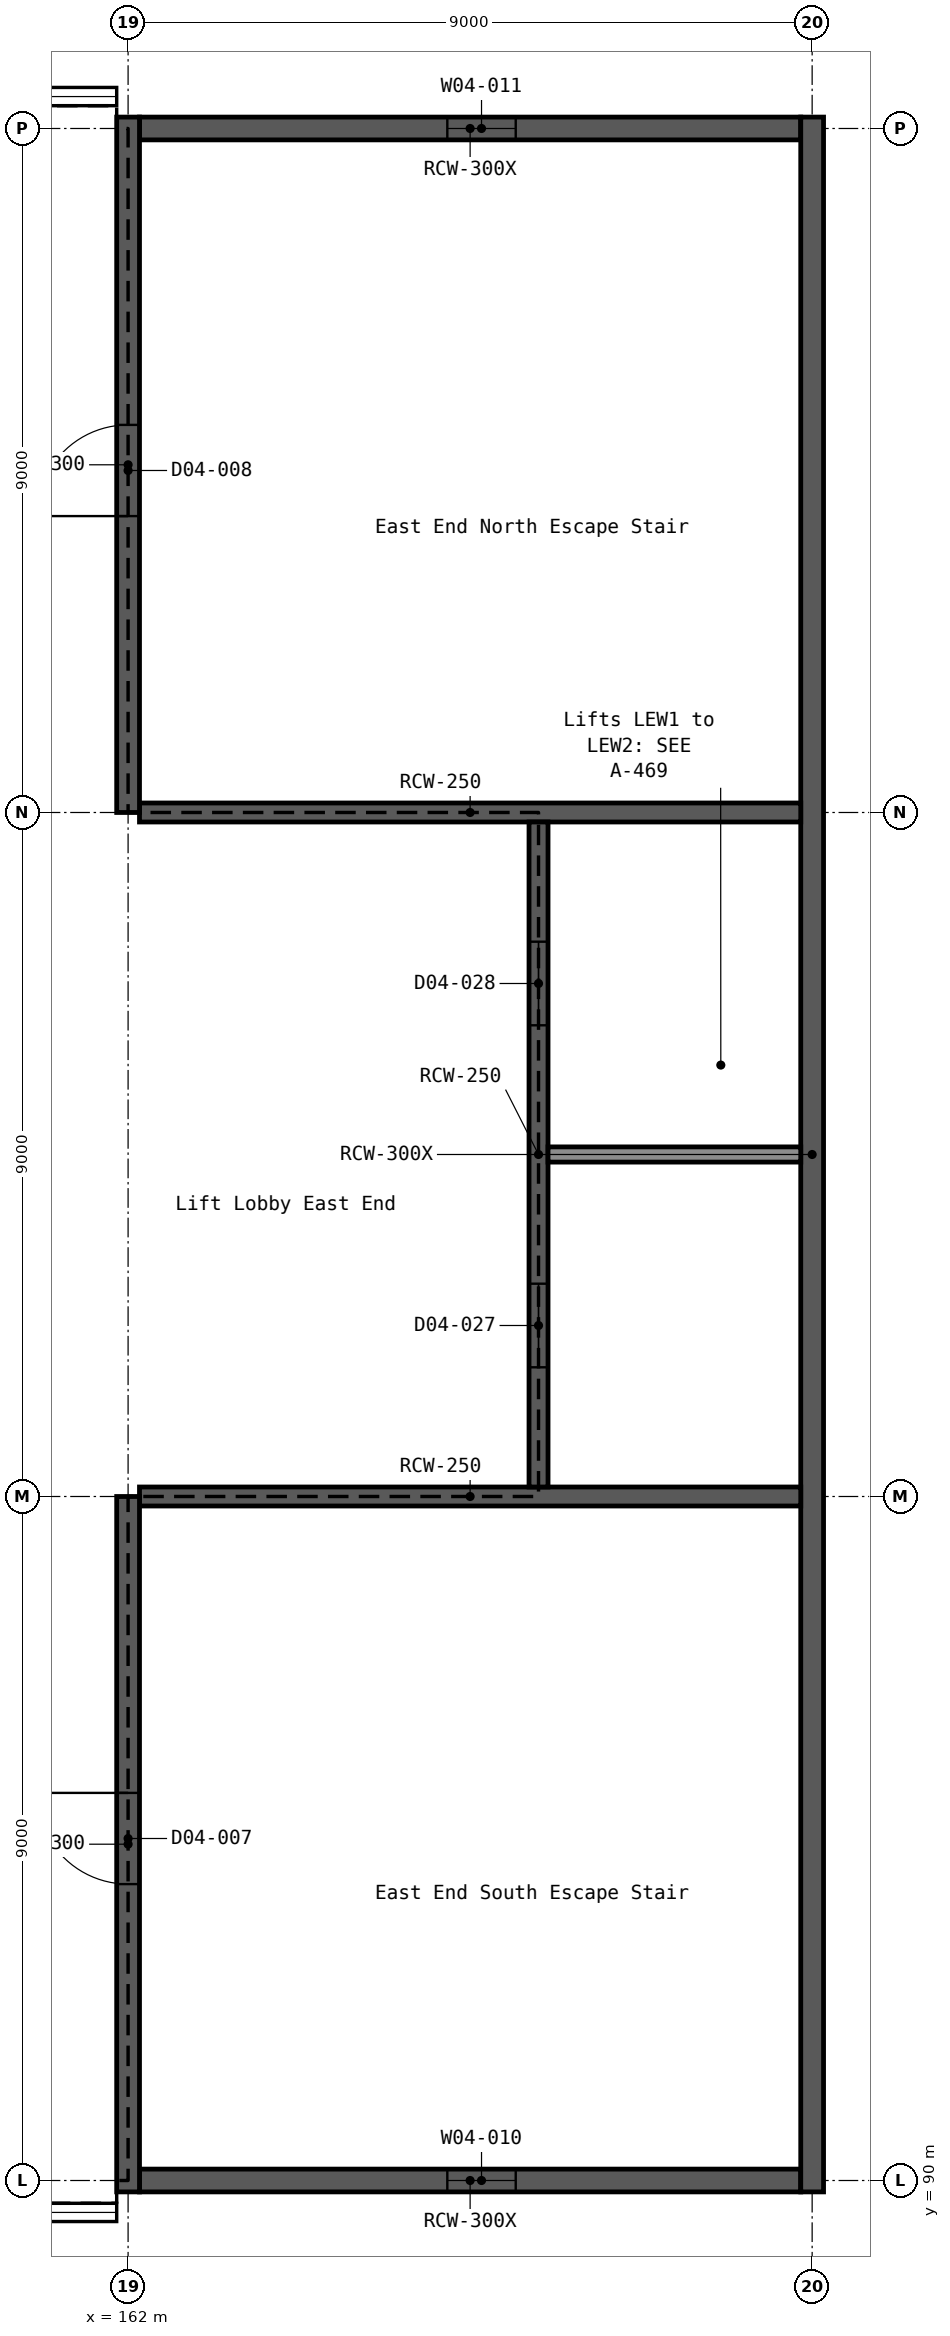
"""IFC4 building model, lengths in metres.
Left out: names, types, materials, properties, quantities, classifications, styles, units other than length and angle.
Written with IfcOpenShell. Run it as: python <this file> out.ifc"""

import sys

from ifc_helpers import new_model, si_unit, direction, frame, frame_2d, origin, place, context, subcontext, project, spatial, rectangle, extrude, element, fill, save


model = new_model("IFC4")
c1 = context("Model", 3, precision=1e-05, world=origin(), true_north=direction((0.0, 1.0)))
c2 = subcontext(c1, "Body", "Model", "MODEL_VIEW")
j1 = project(units=[si_unit("LENGTHUNIT", "METRE"), si_unit("PLANEANGLEUNIT", "RADIAN")], contexts=[c1])
p1 = place(None, origin())
s1 = spatial("IfcSite", under=j1, at=p1, CompositionType="ELEMENT")
p2 = place(p1, origin())
s2 = spatial("IfcBuilding", under=s1, at=p2, CompositionType="ELEMENT")
p3 = place(p2, frame((0.0, 0.0, 21.6)))
s3 = spatial("IfcBuildingStorey", under=s2, at=p3, CompositionType="ELEMENT", Elevation=21.6)
p4 = place(p3, frame((162.15, 90.0, 0.0), z_axis=(0.0, 0.0, 1.0), x_axis=(1.0, 0.0, 0.0)))
e1 = element("IfcWall", 1, at=p4, inside=s3, PredefinedType="SHEAR", context=c2, shape_type="SweptSolid", body=[
    extrude(rectangle(XDim=8.7, YDim=0.3, at=frame_2d((4.35, 0.0))), origin(), (0.0, 0.0, 1.0), 5.4),
])
p5 = place(p4, frame((4.05, 0.0, 1.5)))
e2 = element("IfcOpeningElement", 2, at=p5, cuts=e1, PredefinedType="OPENING", context=c2, shape_type="SweptSolid", body=[
    extrude(rectangle(XDim=0.9, YDim=1.2, at=frame_2d((0.45, 0.6))), frame((0.0, 0.161, 0.0), z_axis=(0.0, -1.0, 0.0), x_axis=(1.0, 0.0, 0.0)), (0.0, 0.0, 1.0), 0.322),
])
p6 = place(p3, frame((162.15, 117.0, 0.0), z_axis=(0.0, 0.0, 1.0), x_axis=(1.0, 0.0, 0.0)))
e3 = element("IfcWall", 3, at=p6, inside=s3, PredefinedType="SHEAR", context=c2, shape_type="SweptSolid", body=[
    extrude(rectangle(XDim=8.7, YDim=0.3, at=frame_2d((4.35, 0.0))), origin(), (0.0, 0.0, 1.0), 5.4),
])
p7 = place(p6, frame((4.05, 0.0, 1.5)))
e4 = element("IfcOpeningElement", 4, at=p7, cuts=e3, PredefinedType="OPENING", context=c2, shape_type="SweptSolid", body=[
    extrude(rectangle(XDim=0.9, YDim=1.2, at=frame_2d((0.45, 0.6))), frame((0.0, 0.161, 0.0), z_axis=(0.0, -1.0, 0.0), x_axis=(1.0, 0.0, 0.0)), (0.0, 0.0, 1.0), 0.322),
])
p8 = place(p3, frame((171.0, 89.85, 0.0), z_axis=(0.0, 0.0, 1.0), x_axis=(0.0, 1.0, 0.0)))
e5 = element("IfcWall", 5, at=p8, inside=s3, PredefinedType="SHEAR", context=c2, shape_type="SweptSolid", body=[
    extrude(rectangle(XDim=27.3, YDim=0.3, at=frame_2d((13.65, 0.0))), origin(), (0.0, 0.0, 1.0), 5.4),
])
for number, where, z_axis, x_axis in (
    (6, (162.15, 99.0, 0.0), (0.0, 0.0, 1.0), (1.0, 0.0, 0.0)),
    (7, (162.15, 108.0, 0.0), (0.0, 0.0, 1.0), (1.0, 0.0, 0.0)),
):
    element("IfcWall", number, at=place(p3, frame(where, z_axis=z_axis, x_axis=x_axis)), inside=s3, PredefinedType="SHEAR", context=c2, shape_type="SweptSolid", body=[
        extrude(rectangle(XDim=8.7, YDim=0.25, at=frame_2d((4.35, 0.0))), origin(), (0.0, 0.0, 1.0), 5.4),
    ])
p9 = place(p3, frame((167.4, 99.125, 0.0), z_axis=(0.0, 0.0, 1.0), x_axis=(0.0, 1.0, 0.0)))
e8 = element("IfcWall", 8, at=p9, inside=s3, PredefinedType="SHEAR", context=c2, shape_type="SweptSolid", body=[
    extrude(rectangle(XDim=8.75, YDim=0.25, at=frame_2d((4.375, 0.0))), origin(), (0.0, 0.0, 1.0), 5.4),
])
p10 = place(p9, frame((1.575, 0.0, 0.0)))
e9 = element("IfcOpeningElement", 9, at=p10, cuts=e8, PredefinedType="OPENING", context=c2, shape_type="SweptSolid", body=[
    extrude(rectangle(XDim=1.1, YDim=2.1, at=frame_2d((0.55, 1.05))), frame((0.0, 0.136, 0.0), z_axis=(0.0, -1.0, 0.0), x_axis=(1.0, 0.0, 0.0)), (0.0, 0.0, 1.0), 0.272),
])
p11 = place(p9, frame((6.075, 0.0, 0.0)))
e10 = element("IfcOpeningElement", 10, at=p11, cuts=e8, PredefinedType="OPENING", context=c2, shape_type="SweptSolid", body=[
    extrude(rectangle(XDim=1.1, YDim=2.1, at=frame_2d((0.55, 1.05))), frame((0.0, 0.136, 0.0), z_axis=(0.0, -1.0, 0.0), x_axis=(1.0, 0.0, 0.0)), (0.0, 0.0, 1.0), 0.272),
])
p12 = place(p3, frame((162.0, 89.85, 0.0), z_axis=(0.0, 0.0, 1.0), x_axis=(0.0, 1.0, 0.0)))
e11 = element("IfcWall", 11, at=p12, inside=s3, PredefinedType="SHEAR", context=c2, shape_type="SweptSolid", body=[
    extrude(rectangle(XDim=9.15, YDim=0.3, at=frame_2d((4.575, 0.0))), origin(), (0.0, 0.0, 1.0), 5.4),
])
p13 = place(p12, frame((4.05, 0.0, 0.0)))
e12 = element("IfcOpeningElement", 12, at=p13, cuts=e11, PredefinedType="OPENING", context=c2, shape_type="SweptSolid", body=[
    extrude(rectangle(XDim=1.2, YDim=2.1, at=frame_2d((0.6, 1.05))), frame((0.0, 0.161, 0.0), z_axis=(0.0, -1.0, 0.0), x_axis=(1.0, 0.0, 0.0)), (0.0, 0.0, 1.0), 0.322),
])
p14 = place(p3, frame((162.0, 108.0, 0.0), z_axis=(0.0, 0.0, 1.0), x_axis=(0.0, 1.0, 0.0)))
e13 = element("IfcWall", 13, at=p14, inside=s3, PredefinedType="SHEAR", context=c2, shape_type="SweptSolid", body=[
    extrude(rectangle(XDim=9.15, YDim=0.3, at=frame_2d((4.575, 0.0))), origin(), (0.0, 0.0, 1.0), 5.4),
])
p15 = place(p14, frame((3.9, 0.0, 0.0)))
e14 = element("IfcOpeningElement", 14, at=p15, cuts=e13, PredefinedType="OPENING", context=c2, shape_type="SweptSolid", body=[
    extrude(rectangle(XDim=1.2, YDim=2.1, at=frame_2d((0.6, 1.05))), frame((0.0, 0.161, 0.0), z_axis=(0.0, -1.0, 0.0), x_axis=(1.0, 0.0, 0.0)), (0.0, 0.0, 1.0), 0.322),
])
p16 = place(p3, frame((167.525, 103.5, 0.0), z_axis=(0.0, 0.0, 1.0), x_axis=(1.0, 0.0, 0.0)))
e15 = element("IfcWall", 15, at=p16, inside=s3, PredefinedType="SOLIDWALL", context=c2, shape_type="SweptSolid", body=[
    extrude(rectangle(XDim=3.325, YDim=0.2, at=frame_2d((1.663, 0.0))), origin(), (0.0, 0.0, 1.0), 5.4),
])
p17 = place(p5, origin())
e16 = element("IfcWindow", 16, at=p17, inside=s3, PartitioningType="SINGLE_PANEL", PredefinedType="WINDOW", context=c2, shape_type="SweptSolid", body=[
    extrude(rectangle(XDim=0.9, YDim=1.2, at=frame_2d((0.45, 0.6))), frame((0.0, 0.03, 0.0), z_axis=(0.0, -1.0, 0.0), x_axis=(1.0, 0.0, 0.0)), (0.0, 0.0, 1.0), 0.06),
])
fill(e2, e16)
p18 = place(p7, origin())
e17 = element("IfcWindow", 17, at=p18, inside=s3, PartitioningType="SINGLE_PANEL", PredefinedType="WINDOW", context=c2, shape_type="SweptSolid", body=[
    extrude(rectangle(XDim=0.9, YDim=1.2, at=frame_2d((0.45, 0.6))), frame((0.0, 0.03, 0.0), z_axis=(0.0, -1.0, 0.0), x_axis=(1.0, 0.0, 0.0)), (0.0, 0.0, 1.0), 0.06),
])
fill(e4, e17)
p19 = place(p13, origin())
e18 = element("IfcDoor", 18, at=p19, inside=s3, OperationType="SINGLE_SWING_RIGHT", PredefinedType="DOOR", context=c2, shape_type="SweptSolid", body=[
    extrude(rectangle(XDim=1.2, YDim=2.1, at=frame_2d((0.6, 1.05))), frame((0.0, 0.025, 0.0), z_axis=(0.0, -1.0, 0.0), x_axis=(1.0, 0.0, 0.0)), (0.0, 0.0, 1.0), 0.05),
])
fill(e12, e18)
p20 = place(p15, origin())
e19 = element("IfcDoor", 19, at=p20, inside=s3, OperationType="SINGLE_SWING_LEFT", PredefinedType="DOOR", context=c2, shape_type="SweptSolid", body=[
    extrude(rectangle(XDim=1.2, YDim=2.1, at=frame_2d((0.6, 1.05))), frame((0.0, 0.025, 0.0), z_axis=(0.0, -1.0, 0.0), x_axis=(1.0, 0.0, 0.0)), (0.0, 0.0, 1.0), 0.05),
])
fill(e14, e19)
p21 = place(p10, origin())
e20 = element("IfcDoor", 20, at=p21, inside=s3, OperationType="DOUBLE_DOOR_SLIDING", PredefinedType="DOOR", context=c2, shape_type="SweptSolid", body=[
    extrude(rectangle(XDim=1.1, YDim=2.1, at=frame_2d((0.55, 1.05))), frame((0.0, 0.025, 0.0), z_axis=(0.0, -1.0, 0.0), x_axis=(1.0, 0.0, 0.0)), (0.0, 0.0, 1.0), 0.05),
])
fill(e9, e20)
p22 = place(p11, origin())
e21 = element("IfcDoor", 21, at=p22, inside=s3, OperationType="DOUBLE_DOOR_SLIDING", PredefinedType="DOOR", context=c2, shape_type="SweptSolid", body=[
    extrude(rectangle(XDim=1.1, YDim=2.1, at=frame_2d((0.55, 1.05))), frame((0.0, 0.025, 0.0), z_axis=(0.0, -1.0, 0.0), x_axis=(1.0, 0.0, 0.0)), (0.0, 0.0, 1.0), 0.05),
])
fill(e10, e21)
save(model, sys.argv[1])
